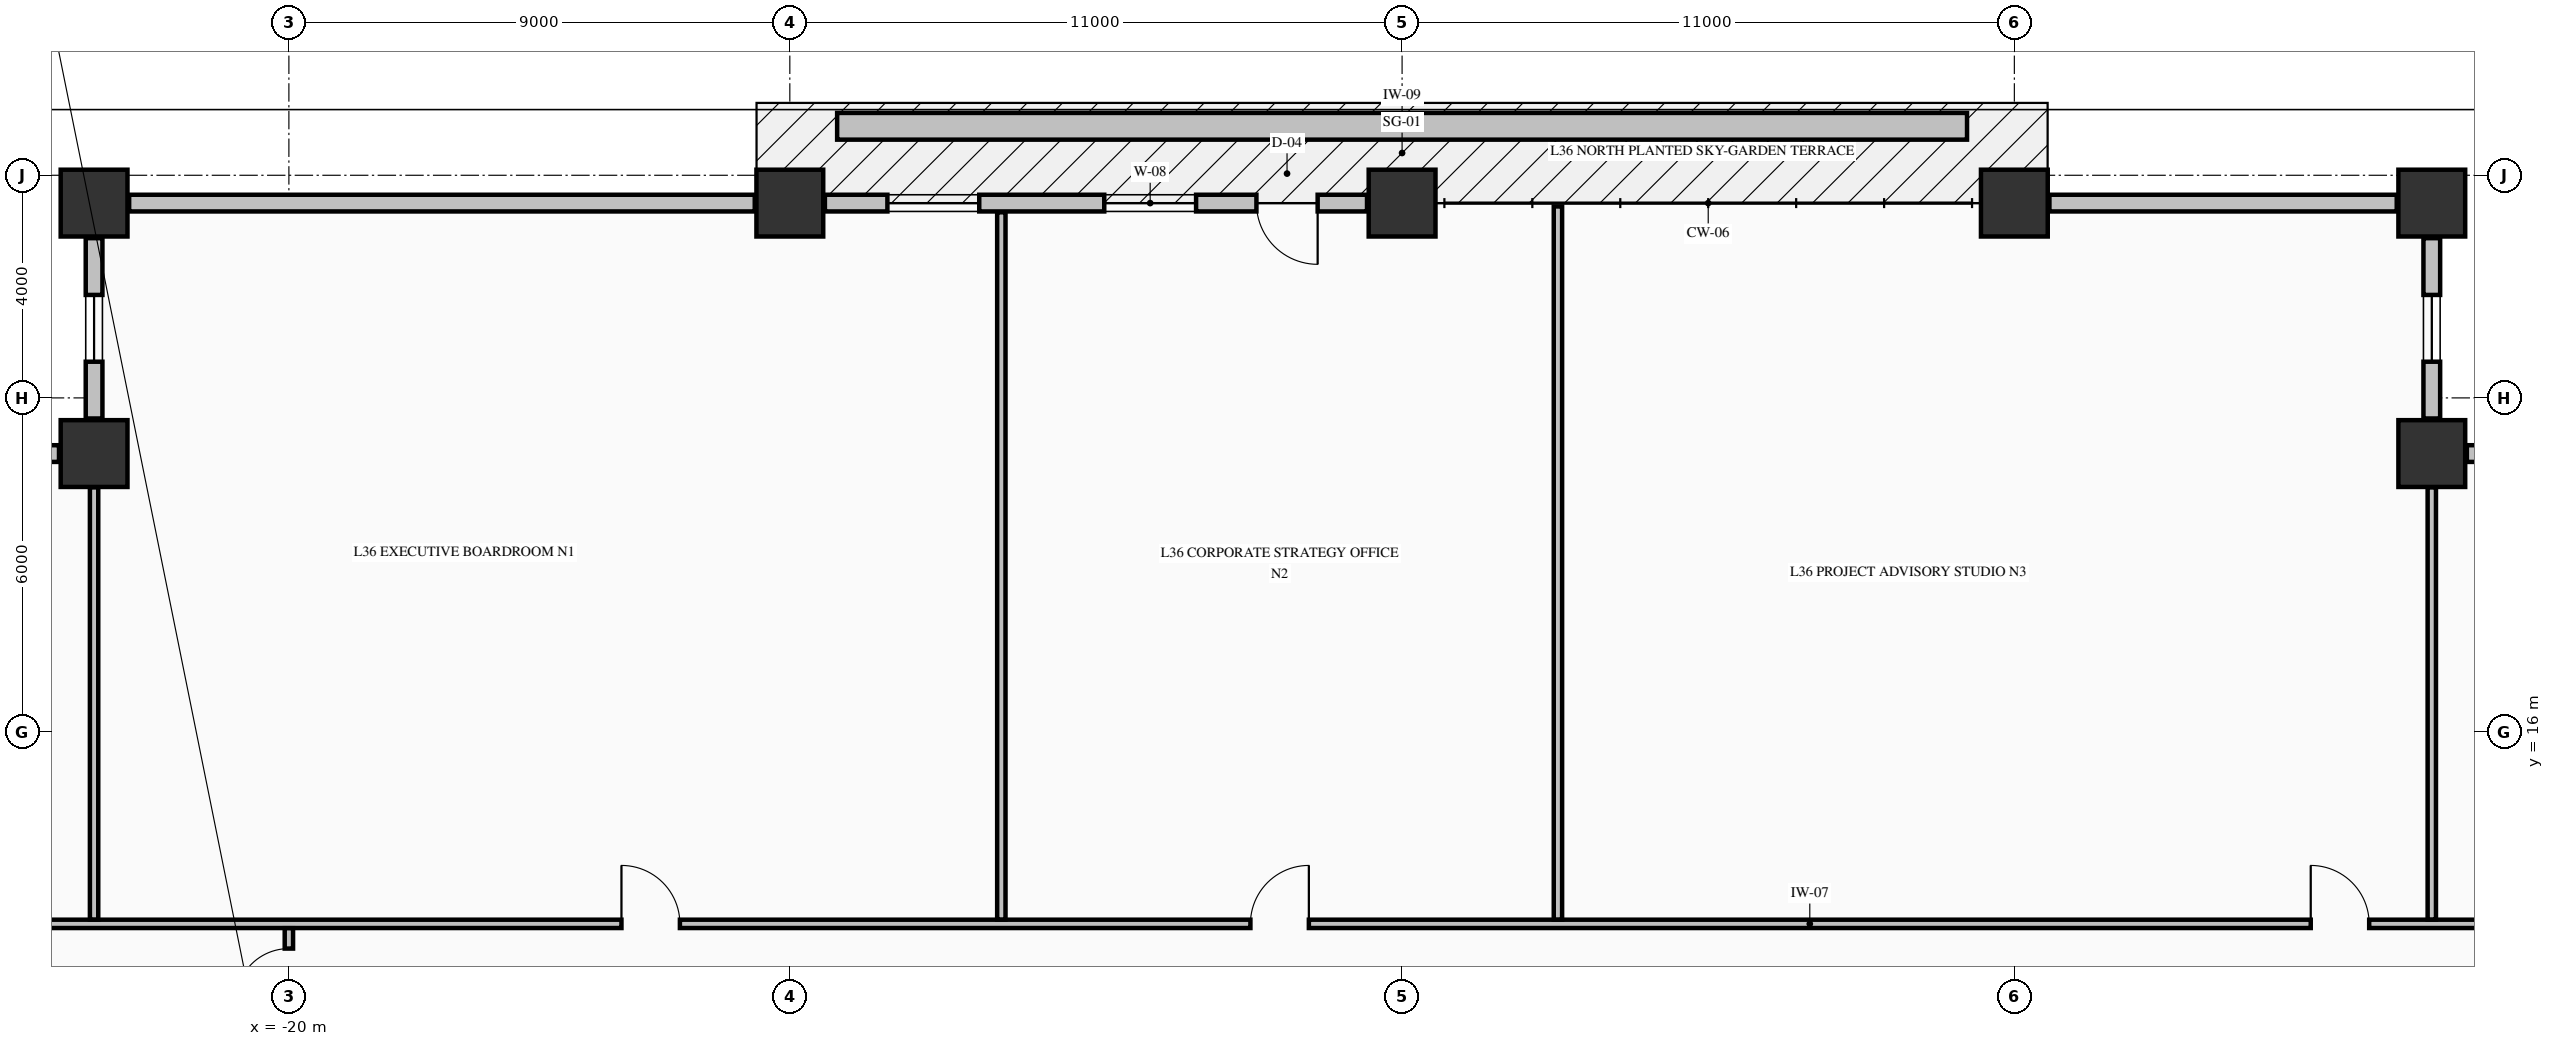
"""IFC4 building model, lengths in metres.
Left out: names, types, materials, properties, quantities, classifications, styles, units other than length and angle.
Written with IfcOpenShell. Run it as: python <this file> out.ifc"""

import sys

from ifc_helpers import new_model, si_unit, direction, frame, frame_2d, origin, origin_2d, place, context, subcontext, project, spatial, rectangle, extrude, element, fill, save


model = new_model("IFC4")
c1 = context("Model", 3, precision=1e-05, world=origin(), true_north=direction((0.0, 1.0)))
c2 = subcontext(c1, "Body", "Model", "MODEL_VIEW")
j1 = project(units=[si_unit("LENGTHUNIT", "METRE"), si_unit("PLANEANGLEUNIT", "RADIAN")], contexts=[c1])
p1 = place(None, origin())
s1 = spatial("IfcSite", under=j1, at=p1, CompositionType="ELEMENT")
p2 = place(p1, origin())
s2 = spatial("IfcBuilding", under=s1, at=p2, CompositionType="ELEMENT")
p3 = place(p2, frame((0.0, 0.0, 142.77)))
s3 = spatial("IfcBuildingStorey", under=s2, at=p3, CompositionType="ELEMENT", Elevation=142.77)
for number, where, z_axis, x_axis in (
    (1, (-23.5, 25.5, -0.325), (0.0, 0.0, 1.0), (1.0, 0.0, 0.0)),
    (2, (-11.0, 25.5, -0.325), (0.0, 0.0, 1.0), (1.0, 0.0, 0.0)),
    (3, (0.0, 25.5, -0.325), (0.0, 0.0, 1.0), (1.0, 0.0, 0.0)),
    (4, (11.0, 25.5, -0.325), (0.0, 0.0, 1.0), (1.0, 0.0, 0.0)),
    (5, (18.5, 25.5, -0.325), (0.0, 0.0, 1.0), (1.0, 0.0, 0.0)),
    (6, (18.5, 21.0, -0.325), (0.0, 0.0, 1.0), (1.0, 0.0, 0.0)),
    (7, (-23.5, 21.0, -0.325), (0.0, 0.0, 1.0), (1.0, 0.0, 0.0)),
):
    element("IfcColumn", number, at=place(p3, frame(where, z_axis=z_axis, x_axis=x_axis)), inside=s3, PredefinedType="COLUMN", context=c2, shape_type="SweptSolid", body=[
        extrude(rectangle(XDim=1.2, YDim=1.2, at=origin_2d()), origin(), (0.0, 0.0, 1.0), 3.645),
    ])
p4 = place(p3, frame((22.37, 21.0, 0.0), z_axis=(0.0, 0.0, 1.0), x_axis=(-1.0, 0.0, 0.0)))
e8 = element("IfcWall", 8, at=p4, inside=s3, PredefinedType="STANDARD", context=c2, shape_type="SweptSolid", body=[
    extrude(rectangle(XDim=3.24, YDim=0.3, at=frame_2d((1.62, 0.0))), origin(), (0.0, 0.0, 1.0), 2.712),
])
p5 = place(p4, frame((1.02, 0.0, 0.82)))
e9 = element("IfcOpeningElement", 9, at=p5, cuts=e8, PredefinedType="OPENING", context=c2, shape_type="SweptSolid", body=[
    extrude(rectangle(XDim=1.2, YDim=1.65, at=frame_2d((0.6, 0.825))), frame((0.0, 0.16, 0.0), z_axis=(0.0, -1.0, 0.0), x_axis=(1.0, 0.0, 0.0)), (0.0, 0.0, 1.0), 0.32),
])
p6 = place(p3, frame((18.5, 21.63, 0.0), z_axis=(0.0, 0.0, 1.0), x_axis=(0.0, 1.0, 0.0)))
e10 = element("IfcWall", 10, at=p6, inside=s3, PredefinedType="STANDARD", context=c2, shape_type="SweptSolid", body=[
    extrude(rectangle(XDim=3.24, YDim=0.3, at=frame_2d((1.62, 0.0))), origin(), (0.0, 0.0, 1.0), 2.712),
])
p7 = place(p6, frame((1.02, 0.0, 0.82)))
e11 = element("IfcOpeningElement", 11, at=p7, cuts=e10, PredefinedType="OPENING", context=c2, shape_type="SweptSolid", body=[
    extrude(rectangle(XDim=1.2, YDim=1.65, at=frame_2d((0.6, 0.825))), frame((0.0, 0.16, 0.0), z_axis=(0.0, -1.0, 0.0), x_axis=(1.0, 0.0, 0.0)), (0.0, 0.0, 1.0), 0.32),
])
p8 = place(p3, frame((-23.5, 24.87, 0.0), z_axis=(0.0, 0.0, 1.0), x_axis=(0.0, -1.0, 0.0)))
e12 = element("IfcWall", 12, at=p8, inside=s3, PredefinedType="STANDARD", context=c2, shape_type="SweptSolid", body=[
    extrude(rectangle(XDim=3.24, YDim=0.3, at=frame_2d((1.62, 0.0))), origin(), (0.0, 0.0, 1.0), 2.712),
])
p9 = place(p8, frame((1.02, 0.0, 0.82)))
e13 = element("IfcOpeningElement", 13, at=p9, cuts=e12, PredefinedType="OPENING", context=c2, shape_type="SweptSolid", body=[
    extrude(rectangle(XDim=1.2, YDim=1.65, at=frame_2d((0.6, 0.825))), frame((0.0, 0.16, 0.0), z_axis=(0.0, -1.0, 0.0), x_axis=(1.0, 0.0, 0.0)), (0.0, 0.0, 1.0), 0.32),
])
p10 = place(p3, frame((-24.13, 21.0, 0.0), z_axis=(0.0, 0.0, 1.0), x_axis=(-1.0, 0.0, 0.0)))
e14 = element("IfcWall", 14, at=p10, inside=s3, PredefinedType="STANDARD", context=c2, shape_type="SweptSolid", body=[
    extrude(rectangle(XDim=3.24, YDim=0.3, at=frame_2d((1.62, 0.0))), origin(), (0.0, 0.0, 1.0), 2.712),
])
p11 = place(p10, frame((1.02, 0.0, 0.82)))
e15 = element("IfcOpeningElement", 15, at=p11, cuts=e14, PredefinedType="OPENING", context=c2, shape_type="SweptSolid", body=[
    extrude(rectangle(XDim=1.2, YDim=1.65, at=frame_2d((0.6, 0.825))), frame((0.0, 0.16, 0.0), z_axis=(0.0, -1.0, 0.0), x_axis=(1.0, 0.0, 0.0)), (0.0, 0.0, 1.0), 0.32),
])
p12 = place(p3, frame((-11.63, 25.5, 0.0), z_axis=(0.0, 0.0, 1.0), x_axis=(-1.0, 0.0, 0.0)))
e16 = element("IfcWall", 16, at=p12, inside=s3, PredefinedType="STANDARD", context=c2, shape_type="SweptSolid", body=[
    extrude(rectangle(XDim=11.24, YDim=0.3, at=frame_2d((5.62, 0.0))), origin(), (0.0, 0.0, 1.0), 2.712),
])
p13 = place(p3, frame((-0.63, 25.5, 0.0), z_axis=(0.0, 0.0, 1.0), x_axis=(-1.0, 0.0, 0.0)))
e17 = element("IfcWall", 17, at=p13, inside=s3, PredefinedType="STANDARD", context=c2, shape_type="SweptSolid", body=[
    extrude(rectangle(XDim=9.74, YDim=0.3, at=frame_2d((4.87, 0.0))), origin(), (0.0, 0.0, 1.0), 2.712),
])
p14 = place(p13, frame((0.887, 0.0, 0.0)))
e18 = element("IfcOpeningElement", 18, at=p14, cuts=e17, PredefinedType="OPENING", context=c2, shape_type="SweptSolid", body=[
    extrude(rectangle(XDim=1.1, YDim=2.15, at=frame_2d((0.55, 1.075))), frame((0.0, 0.16, 0.0), z_axis=(0.0, -1.0, 0.0), x_axis=(1.0, 0.0, 0.0)), (0.0, 0.0, 1.0), 0.32),
])
p15 = place(p13, frame((3.071, 0.0, 0.8)))
e19 = element("IfcOpeningElement", 19, at=p15, cuts=e17, PredefinedType="OPENING", context=c2, shape_type="SweptSolid", body=[
    extrude(rectangle(XDim=1.65, YDim=1.7, at=frame_2d((0.825, 0.85))), frame((0.0, 0.16, 0.0), z_axis=(0.0, -1.0, 0.0), x_axis=(1.0, 0.0, 0.0)), (0.0, 0.0, 1.0), 0.32),
])
p16 = place(p13, frame((6.967, 0.0, 0.8)))
e20 = element("IfcOpeningElement", 20, at=p16, cuts=e17, PredefinedType="OPENING", context=c2, shape_type="SweptSolid", body=[
    extrude(rectangle(XDim=1.65, YDim=1.7, at=frame_2d((0.825, 0.85))), frame((0.0, 0.16, 0.0), z_axis=(0.0, -1.0, 0.0), x_axis=(1.0, 0.0, 0.0)), (0.0, 0.0, 1.0), 0.32),
])
p17 = place(p3, frame((17.87, 25.5, 0.0), z_axis=(0.0, 0.0, 1.0), x_axis=(-1.0, 0.0, 0.0)))
e21 = element("IfcWall", 21, at=p17, inside=s3, PredefinedType="STANDARD", context=c2, shape_type="SweptSolid", body=[
    extrude(rectangle(XDim=6.24, YDim=0.3, at=frame_2d((3.12, 0.0))), origin(), (0.0, 0.0, 1.0), 2.712),
])
p18 = place(p3, frame((-27.835, 12.55, 0.0), z_axis=(0.0, 0.0, 1.0), x_axis=(1.0, 0.0, 0.0)))
e22 = element("IfcWall", 22, at=p18, inside=s3, PredefinedType="PARTITIONING", context=c2, shape_type="SweptSolid", body=[
    extrude(rectangle(XDim=50.67, YDim=0.15, at=frame_2d((25.335, 0.0))), origin(), (0.0, 0.0, 1.0), 3.32),
])
p19 = place(p18, frame((13.81, 0.0, 0.0)))
e23 = element("IfcOpeningElement", 23, at=p19, cuts=e22, PredefinedType="OPENING", context=c2, shape_type="SweptSolid", body=[
    extrude(rectangle(XDim=1.05, YDim=2.15, at=frame_2d((0.525, 1.075))), frame((0.0, 0.085, 0.0), z_axis=(0.0, -1.0, 0.0), x_axis=(1.0, 0.0, 0.0)), (0.0, 0.0, 1.0), 0.17),
])
p20 = place(p18, frame((25.11, 0.0, 0.0)))
e24 = element("IfcOpeningElement", 24, at=p20, cuts=e22, PredefinedType="OPENING", context=c2, shape_type="SweptSolid", body=[
    extrude(rectangle(XDim=1.05, YDim=2.15, at=frame_2d((0.525, 1.075))), frame((0.0, 0.085, 0.0), z_axis=(0.0, -1.0, 0.0), x_axis=(1.0, 0.0, 0.0)), (0.0, 0.0, 1.0), 0.17),
])
p21 = place(p18, frame((44.16, 0.0, 0.0)))
e25 = element("IfcOpeningElement", 25, at=p21, cuts=e22, PredefinedType="OPENING", context=c2, shape_type="SweptSolid", body=[
    extrude(rectangle(XDim=1.05, YDim=2.15, at=frame_2d((0.525, 1.075))), frame((0.0, 0.085, 0.0), z_axis=(0.0, -1.0, 0.0), x_axis=(1.0, 0.0, 0.0)), (0.0, 0.0, 1.0), 0.17),
])
p22 = place(p3, frame((-23.5, 12.628, 0.0), z_axis=(0.0, 0.0, 1.0), x_axis=(0.0, 1.0, 0.0)))
e26 = element("IfcWall", 26, at=p22, inside=s3, PredefinedType="PARTITIONING", context=c2, shape_type="SweptSolid", body=[
    extrude(rectangle(XDim=7.766, YDim=0.15, at=frame_2d((3.883, 0.0))), origin(), (0.0, 0.0, 1.0), 3.32),
])
p23 = place(p3, frame((-20.0, 11.006, 0.0), z_axis=(0.0, 0.0, 1.0), x_axis=(0.0, 1.0, 0.0)))
e27 = element("IfcWall", 27, at=p23, inside=s3, PredefinedType="PARTITIONING", context=c2, shape_type="SweptSolid", body=[
    extrude(rectangle(XDim=1.466, YDim=0.15, at=frame_2d((0.733, 0.0))), origin(), (0.0, 0.0, 1.0), 2.81),
])
p24 = place(p23, frame((0.15, 0.0, 0.0)))
e28 = element("IfcOpeningElement", 28, at=p24, cuts=e27, PredefinedType="OPENING", context=c2, shape_type="SweptSolid", body=[
    extrude(rectangle(XDim=0.95, YDim=2.15, at=frame_2d((0.475, 1.075))), frame((0.0, 0.085, 0.0), z_axis=(0.0, -1.0, 0.0), x_axis=(1.0, 0.0, 0.0)), (0.0, 0.0, 1.0), 0.17),
])
p25 = place(p3, frame((-7.2, 12.628, 0.0), z_axis=(0.0, 0.0, 1.0), x_axis=(0.0, 1.0, 0.0)))
e29 = element("IfcWall", 29, at=p25, inside=s3, PredefinedType="PARTITIONING", context=c2, shape_type="SweptSolid", body=[
    extrude(rectangle(XDim=12.707, YDim=0.15, at=frame_2d((6.354, 0.0))), origin(), (0.0, 0.0, 1.0), 3.32),
])
p26 = place(p3, frame((2.8, 12.628, 0.0), z_axis=(0.0, 0.0, 1.0), x_axis=(0.0, 1.0, 0.0)))
e30 = element("IfcWall", 30, at=p26, inside=s3, PredefinedType="PARTITIONING", context=c2, shape_type="SweptSolid", body=[
    extrude(rectangle(XDim=12.812, YDim=0.15, at=frame_2d((6.406, 0.0))), origin(), (0.0, 0.0, 1.0), 3.32),
])
p27 = place(p3, frame((18.5, 12.628, 0.0), z_axis=(0.0, 0.0, 1.0), x_axis=(0.0, 1.0, 0.0)))
e31 = element("IfcWall", 31, at=p27, inside=s3, PredefinedType="PARTITIONING", context=c2, shape_type="SweptSolid", body=[
    extrude(rectangle(XDim=7.766, YDim=0.15, at=frame_2d((3.883, 0.0))), origin(), (0.0, 0.0, 1.0), 3.32),
])
p28 = place(p3, frame((-10.15, 26.88, -0.04), z_axis=(0.0, 0.0, 1.0), x_axis=(1.0, 0.0, 0.0)))
e32 = element("IfcWall", 32, at=p28, inside=s3, PredefinedType="PARAPET", context=c2, shape_type="SweptSolid", body=[
    extrude(rectangle(XDim=20.3, YDim=0.48, at=frame_2d((10.15, 0.0))), origin(), (0.0, 0.0, 1.0), 0.52),
])
p29 = place(p7, origin())
e33 = element("IfcWindow", 33, at=p29, inside=s3, PartitioningType="SINGLE_PANEL", PredefinedType="WINDOW", context=c2, shape_type="SweptSolid", body=[
    extrude(rectangle(XDim=1.2, YDim=1.65, at=frame_2d((0.6, 0.825))), frame((0.0, 0.03, 0.0), z_axis=(0.0, -1.0, 0.0), x_axis=(1.0, 0.0, 0.0)), (0.0, 0.0, 1.0), 0.06),
])
fill(e11, e33)
p30 = place(p9, origin())
e34 = element("IfcWindow", 34, at=p30, inside=s3, PartitioningType="SINGLE_PANEL", PredefinedType="WINDOW", context=c2, shape_type="SweptSolid", body=[
    extrude(rectangle(XDim=1.2, YDim=1.65, at=frame_2d((0.6, 0.825))), frame((0.0, 0.03, 0.0), z_axis=(0.0, -1.0, 0.0), x_axis=(1.0, 0.0, 0.0)), (0.0, 0.0, 1.0), 0.06),
])
fill(e13, e34)
p31 = place(p14, origin())
e35 = element("IfcDoor", 35, at=p31, inside=s3, OperationType="SINGLE_SWING_LEFT", PredefinedType="DOOR", context=c2, shape_type="SweptSolid", body=[
    extrude(rectangle(XDim=1.1, YDim=2.15, at=frame_2d((0.55, 1.075))), frame((0.0, 0.025, 0.0), z_axis=(0.0, -1.0, 0.0), x_axis=(1.0, 0.0, 0.0)), (0.0, 0.0, 1.0), 0.05),
])
fill(e18, e35)
p32 = place(p15, origin())
e36 = element("IfcWindow", 36, at=p32, inside=s3, PartitioningType="SINGLE_PANEL", PredefinedType="WINDOW", context=c2, shape_type="SweptSolid", body=[
    extrude(rectangle(XDim=1.65, YDim=1.7, at=frame_2d((0.825, 0.85))), frame((0.0, 0.03, 0.0), z_axis=(0.0, -1.0, 0.0), x_axis=(1.0, 0.0, 0.0)), (0.0, 0.0, 1.0), 0.06),
])
fill(e19, e36)
p33 = place(p16, origin())
e37 = element("IfcWindow", 37, at=p33, inside=s3, PartitioningType="SINGLE_PANEL", PredefinedType="WINDOW", context=c2, shape_type="SweptSolid", body=[
    extrude(rectangle(XDim=1.65, YDim=1.7, at=frame_2d((0.825, 0.85))), frame((0.0, 0.03, 0.0), z_axis=(0.0, -1.0, 0.0), x_axis=(1.0, 0.0, 0.0)), (0.0, 0.0, 1.0), 0.06),
])
fill(e20, e37)
p34 = place(p19, origin())
e38 = element("IfcDoor", 38, at=p34, inside=s3, OperationType="SINGLE_SWING_LEFT", PredefinedType="DOOR", context=c2, shape_type="SweptSolid", body=[
    extrude(rectangle(XDim=1.05, YDim=2.15, at=frame_2d((0.525, 1.075))), frame((0.0, 0.025, 0.0), z_axis=(0.0, -1.0, 0.0), x_axis=(1.0, 0.0, 0.0)), (0.0, 0.0, 1.0), 0.05),
])
fill(e23, e38)
p35 = place(p20, origin())
e39 = element("IfcDoor", 39, at=p35, inside=s3, OperationType="SINGLE_SWING_RIGHT", PredefinedType="DOOR", context=c2, shape_type="SweptSolid", body=[
    extrude(rectangle(XDim=1.05, YDim=2.15, at=frame_2d((0.525, 1.075))), frame((0.0, 0.025, 0.0), z_axis=(0.0, -1.0, 0.0), x_axis=(1.0, 0.0, 0.0)), (0.0, 0.0, 1.0), 0.05),
])
fill(e24, e39)
p36 = place(p21, origin())
e40 = element("IfcDoor", 40, at=p36, inside=s3, OperationType="SINGLE_SWING_LEFT", PredefinedType="DOOR", context=c2, shape_type="SweptSolid", body=[
    extrude(rectangle(XDim=1.05, YDim=2.15, at=frame_2d((0.525, 1.075))), frame((0.0, 0.025, 0.0), z_axis=(0.0, -1.0, 0.0), x_axis=(1.0, 0.0, 0.0)), (0.0, 0.0, 1.0), 0.05),
])
fill(e25, e40)
p37 = place(p24, origin())
e41 = element("IfcDoor", 41, at=p37, inside=s3, OperationType="SINGLE_SWING_LEFT", PredefinedType="DOOR", context=c2, shape_type="SweptSolid", body=[
    extrude(rectangle(XDim=0.95, YDim=2.15, at=frame_2d((0.475, 1.075))), frame((0.0, 0.025, 0.0), z_axis=(0.0, -1.0, 0.0), x_axis=(1.0, 0.0, 0.0)), (0.0, 0.0, 1.0), 0.05),
])
fill(e28, e41)
save(model, sys.argv[1])
